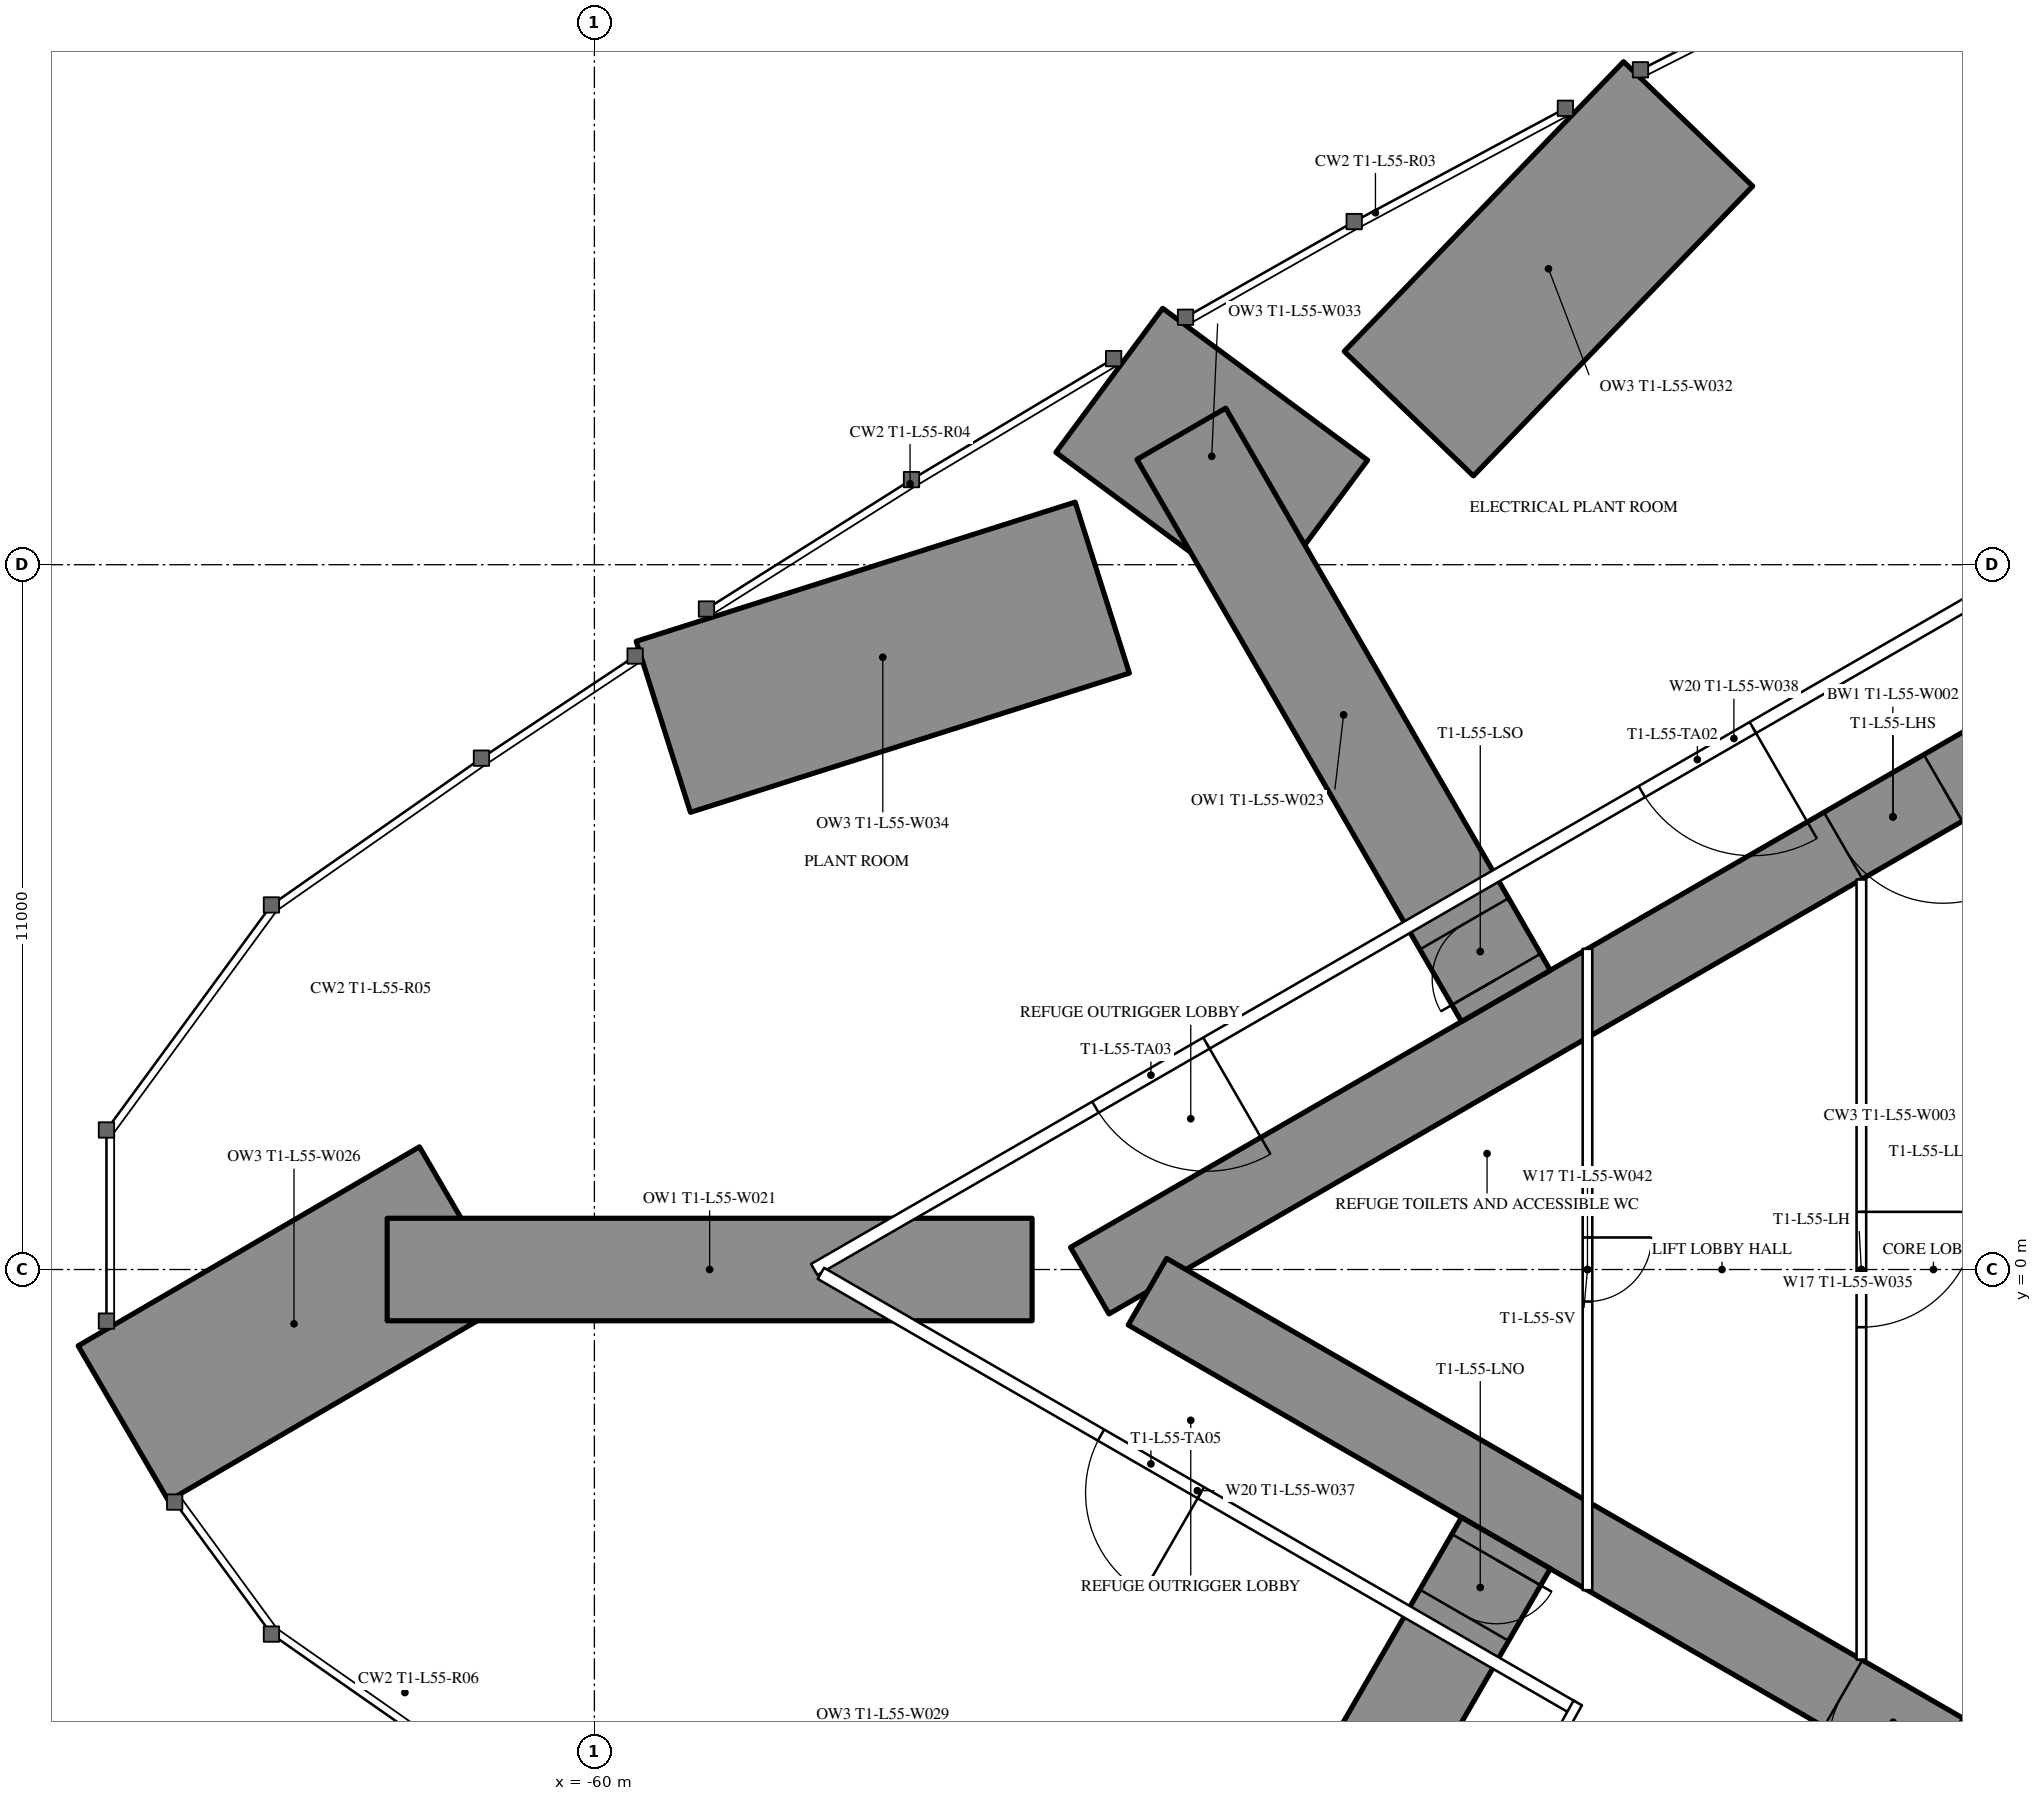
"""IFC4 building model, lengths in metres.
Left out: names, types, materials, properties, quantities, classifications, styles, units other than length and angle.
Written with IfcOpenShell. Run it as: python <this file> out.ifc"""

import sys

from ifc_helpers import new_model, si_unit, direction, frame, frame_2d, origin, place, context, subcontext, project, spatial, rectangle, extrude, element, fill, save


model = new_model("IFC4")
c1 = context("Model", 3, precision=1e-05, world=origin(), true_north=direction((0.0, 1.0)))
c2 = subcontext(c1, "Body", "Model", "MODEL_VIEW")
j1 = project(units=[si_unit("LENGTHUNIT", "METRE"), si_unit("PLANEANGLEUNIT", "RADIAN")], contexts=[c1])
p1 = place(None, origin())
s1 = spatial("IfcSite", under=j1, at=p1, CompositionType="ELEMENT")
p2 = place(p1, origin())
s2 = spatial("IfcBuilding", under=s1, at=p2, CompositionType="ELEMENT")
p3 = place(p2, frame((0.0, 0.0, 205.3)))
s3 = spatial("IfcBuildingStorey", under=s2, at=p3, CompositionType="ELEMENT", Elevation=205.3)
p4 = place(p3, frame((-67.352, -2.4, 0.0), z_axis=(0.0, 0.0, 1.0), x_axis=(0.863922467906, 0.503624830054, 0.0)))
e1 = element("IfcWall", 1, at=p4, inside=s3, PredefinedType="SHEAR", context=c2, shape_type="SweptSolid", body=[
    extrude(rectangle(XDim=6.166, YDim=2.8, at=frame_2d((3.083, 0.0))), origin(), (0.0, 0.0, 1.0), 5.0),
])
p5 = place(p3, frame((-42.929, 17.879, 0.0), z_axis=(0.0, 0.0, 1.0), x_axis=(-0.694103918888, -0.719874815356, 0.0)))
e2 = element("IfcWall", 2, at=p5, inside=s3, PredefinedType="SHEAR", context=c2, shape_type="SweptSolid", body=[
    extrude(rectangle(XDim=6.281, YDim=2.8, at=frame_2d((3.141, 0.0))), origin(), (0.0, 0.0, 1.0), 5.0),
])
p6 = place(p3, frame((-51.964, 13.877, 0.0), z_axis=(0.0, 0.0, 1.0), x_axis=(0.80337247009, -0.595476846151, 0.0)))
e3 = element("IfcWall", 3, at=p6, inside=s3, PredefinedType="SHEAR", context=c2, shape_type="SweptSolid", body=[
    extrude(rectangle(XDim=3.981, YDim=2.8, at=frame_2d((1.99, 0.0))), origin(), (0.0, 0.0, 1.0), 5.0),
])
p7 = place(p3, frame((-58.924, 8.47, 0.0), z_axis=(0.0, 0.0, 1.0), x_axis=(0.953237559777, 0.302222028698, 0.0)))
e4 = element("IfcWall", 4, at=p7, inside=s3, PredefinedType="SHEAR", context=c2, shape_type="SweptSolid", body=[
    extrude(rectangle(XDim=7.187, YDim=2.8, at=frame_2d((3.594, 0.0))), origin(), (0.0, 0.0, 1.0), 5.0),
])
p8 = place(p3, frame((-27.2, 14.3, 0.0), z_axis=(0.0, 0.0, 1.0), x_axis=(-0.866026593062, -0.499997940104, 0.0)))
e5 = element("IfcWall", 5, at=p8, inside=s3, PredefinedType="SHEAR", context=c2, shape_type="SweptSolid", body=[
    extrude(rectangle(XDim=28.946, YDim=1.2, at=frame_2d((14.473, 0.0))), origin(), (0.0, 0.0, 1.0), 5.0),
])
p9 = place(p8, frame((6.5, 0.0, 0.0)))
e6 = element("IfcOpeningElement", 6, at=p9, cuts=e5, PredefinedType="OPENING", context=c2, shape_type="SweptSolid", body=[
    extrude(rectangle(XDim=1.0, YDim=2.2, at=frame_2d((0.5, 1.1))), frame((0.0, 0.61, 0.0), z_axis=(0.0, -1.0, 0.0), x_axis=(1.0, 0.0, 0.0)), (0.0, 0.0, 1.0), 1.22),
])
p10 = place(p8, frame((13.568, 0.0, 0.0)))
e7 = element("IfcOpeningElement", 7, at=p10, cuts=e5, PredefinedType="OPENING", context=c2, shape_type="SweptSolid", body=[
    extrude(rectangle(XDim=1.8, YDim=2.2, at=frame_2d((0.9, 1.1))), frame((0.0, 0.61, 0.0), z_axis=(0.0, -1.0, 0.0), x_axis=(1.0, 0.0, 0.0)), (0.0, 0.0, 1.0), 1.22),
])
p11 = place(p3, frame((-27.2, -14.3, 0.0), z_axis=(0.0, 0.0, 1.0), x_axis=(-0.866024021859, 0.500002393557, 0.0)))
e8 = element("IfcWall", 8, at=p11, inside=s3, PredefinedType="SHEAR", context=c2, shape_type="SweptSolid", body=[
    extrude(rectangle(XDim=27.907, YDim=1.2, at=frame_2d((13.954, 0.0))), origin(), (0.0, 0.0, 1.0), 5.0),
])
p12 = place(p11, frame((6.5, 0.0, 0.0)))
e9 = element("IfcOpeningElement", 9, at=p12, cuts=e8, PredefinedType="OPENING", context=c2, shape_type="SweptSolid", body=[
    extrude(rectangle(XDim=1.0, YDim=2.2, at=frame_2d((0.5, 1.1))), frame((0.0, 0.61, 0.0), z_axis=(0.0, -1.0, 0.0), x_axis=(1.0, 0.0, 0.0)), (0.0, 0.0, 1.0), 1.22),
])
p13 = place(p11, frame((13.568, 0.0, 0.0)))
e10 = element("IfcOpeningElement", 10, at=p13, cuts=e8, PredefinedType="OPENING", context=c2, shape_type="SweptSolid", body=[
    extrude(rectangle(XDim=1.8, YDim=2.2, at=frame_2d((0.9, 1.1))), frame((0.0, 0.61, 0.0), z_axis=(0.0, -1.0, 0.0), x_axis=(1.0, 0.0, 0.0)), (0.0, 0.0, 1.0), 1.22),
])
p14 = place(p3, frame((-45.773, 4.27, 0.0), z_axis=(0.0, 0.0, 1.0), x_axis=(-0.499995723283, 0.866027872934, 0.0)))
e11 = element("IfcWall", 11, at=p14, inside=s3, PredefinedType="SHEAR", context=c2, shape_type="SweptSolid", body=[
    extrude(rectangle(XDim=10.131, YDim=1.6, at=frame_2d((5.065, 0.0))), origin(), (0.0, 0.0, 1.0), 5.0),
])
p15 = place(p14, frame((0.3, 0.0, 0.0)))
e12 = element("IfcOpeningElement", 12, at=p15, cuts=e11, PredefinedType="OPENING", context=c2, shape_type="SweptSolid", body=[
    extrude(rectangle(XDim=1.0, YDim=2.2, at=frame_2d((0.5, 1.1))), frame((0.0, 0.81, 0.0), z_axis=(0.0, -1.0, 0.0), x_axis=(1.0, 0.0, 0.0)), (0.0, 0.0, 1.0), 1.62),
])
p16 = place(p3, frame((-53.168, 0.0, 0.0), z_axis=(0.0, 0.0, 1.0), x_axis=(-1.0, 0.0, 0.0)))
e13 = element("IfcWall", 13, at=p16, inside=s3, PredefinedType="SHEAR", context=c2, shape_type="SweptSolid", body=[
    extrude(rectangle(XDim=10.066, YDim=1.6, at=frame_2d((5.033, 0.0))), origin(), (0.0, 0.0, 1.0), 5.0),
])
p17 = place(p3, frame((-45.773, -4.27, 0.0), z_axis=(0.0, 0.0, 1.0), x_axis=(-0.499995723283, -0.866027872934, 0.0)))
e14 = element("IfcWall", 14, at=p17, inside=s3, PredefinedType="SHEAR", context=c2, shape_type="SweptSolid", body=[
    extrude(rectangle(XDim=10.131, YDim=1.6, at=frame_2d((5.065, 0.0))), origin(), (0.0, 0.0, 1.0), 5.0),
])
p18 = place(p17, frame((0.3, 0.0, 0.0)))
e15 = element("IfcOpeningElement", 15, at=p18, cuts=e14, PredefinedType="OPENING", context=c2, shape_type="SweptSolid", body=[
    extrude(rectangle(XDim=1.0, YDim=2.2, at=frame_2d((0.5, 1.1))), frame((0.0, 0.81, 0.0), z_axis=(0.0, -1.0, 0.0), x_axis=(1.0, 0.0, 0.0)), (0.0, 0.0, 1.0), 1.62),
])
p19 = place(p3, frame((-27.86, 16.575, 0.0), z_axis=(0.0, 0.0, 1.0), x_axis=(-0.866025533911, -0.499999774615, 0.0)))
e16 = element("IfcWall", 16, at=p19, inside=s3, PredefinedType="PARTITIONING", context=c2, shape_type="SweptSolid", body=[
    extrude(rectangle(XDim=33.149, YDim=0.2, at=frame_2d((16.575, 0.0))), origin(), (0.0, 0.0, 1.0), 4.75),
])
p20 = place(p19, frame((6.051, 0.0, 0.0)))
e17 = element("IfcOpeningElement", 17, at=p20, cuts=e16, PredefinedType="OPENING", context=c2, shape_type="SweptSolid", body=[
    extrude(rectangle(XDim=1.8, YDim=2.2, at=frame_2d((0.9, 1.1))), frame((0.0, 0.11, 0.0), z_axis=(0.0, -1.0, 0.0), x_axis=(1.0, 0.0, 0.0)), (0.0, 0.0, 1.0), 0.22),
])
p21 = place(p19, frame((16.234, 0.0, 0.0)))
e18 = element("IfcOpeningElement", 18, at=p21, cuts=e16, PredefinedType="OPENING", context=c2, shape_type="SweptSolid", body=[
    extrude(rectangle(XDim=2.0, YDim=2.4, at=frame_2d((1.0, 1.2))), frame((0.0, 0.11, 0.0), z_axis=(0.0, -1.0, 0.0), x_axis=(1.0, 0.0, 0.0)), (0.0, 0.0, 1.0), 0.22),
])
p22 = place(p19, frame((26.082, 0.0, 0.0)))
e19 = element("IfcOpeningElement", 19, at=p22, cuts=e16, PredefinedType="OPENING", context=c2, shape_type="SweptSolid", body=[
    extrude(rectangle(XDim=2.0, YDim=2.4, at=frame_2d((1.0, 1.2))), frame((0.0, 0.11, 0.0), z_axis=(0.0, -1.0, 0.0), x_axis=(1.0, 0.0, 0.0)), (0.0, 0.0, 1.0), 0.22),
])
p23 = place(p3, frame((-44.715, -6.844, 0.0), z_axis=(0.0, 0.0, 1.0), x_axis=(-0.866025261224, 0.500000246922, 0.0)))
e20 = element("IfcWall", 20, at=p23, inside=s3, PredefinedType="PARTITIONING", context=c2, shape_type="SweptSolid", body=[
    extrude(rectangle(XDim=13.567, YDim=0.2, at=frame_2d((6.783, 0.0))), origin(), (0.0, 0.0, 1.0), 4.75),
])
p24 = place(p23, frame((6.719, 0.0, 0.0)))
e21 = element("IfcOpeningElement", 21, at=p24, cuts=e20, PredefinedType="OPENING", context=c2, shape_type="SweptSolid", body=[
    extrude(rectangle(XDim=1.8, YDim=2.2, at=frame_2d((0.9, 1.1))), frame((0.0, 0.11, 0.0), z_axis=(0.0, -1.0, 0.0), x_axis=(1.0, 0.0, 0.0)), (0.0, 0.0, 1.0), 0.22),
])
p25 = place(p3, frame((-44.652, -6.764, 0.0), z_axis=(0.0, 0.0, 1.0), x_axis=(-0.485528096672, -0.8742210632, 0.0)))
e22 = element("IfcWall", 22, at=p25, inside=s3, PredefinedType="PARTITIONING", context=c2, shape_type="SweptSolid", body=[
    extrude(rectangle(XDim=1.805, YDim=0.15, at=frame_2d((0.903, 0.0))), origin(), (0.0, 0.0, 1.0), 4.75),
])
p26 = place(p25, frame((0.453, 0.0, 0.0)))
e23 = element("IfcOpeningElement", 23, at=p26, cuts=e22, PredefinedType="OPENING", context=c2, shape_type="SweptSolid", body=[
    extrude(rectangle(XDim=0.9, YDim=2.2, at=frame_2d((0.45, 1.1))), frame((0.0, 0.085, 0.0), z_axis=(0.0, -1.0, 0.0), x_axis=(1.0, 0.0, 0.0)), (0.0, 0.0, 1.0), 0.17),
])
p27 = place(p3, frame((-40.225, 6.087, 0.0), z_axis=(0.0, 0.0, 1.0), x_axis=(0.0, -1.0, 0.0)))
e24 = element("IfcWall", 24, at=p27, inside=s3, PredefinedType="PARTITIONING", context=c2, shape_type="SweptSolid", body=[
    extrude(rectangle(XDim=12.174, YDim=0.15, at=frame_2d((6.087, 0.0))), origin(), (0.0, 0.0, 1.0), 4.75),
])
p28 = place(p27, frame((5.187, 0.0, 0.0)))
e25 = element("IfcOpeningElement", 25, at=p28, cuts=e24, PredefinedType="OPENING", context=c2, shape_type="SweptSolid", body=[
    extrude(rectangle(XDim=1.8, YDim=2.2, at=frame_2d((0.9, 1.1))), frame((0.0, 0.085, 0.0), z_axis=(0.0, -1.0, 0.0), x_axis=(1.0, 0.0, 0.0)), (0.0, 0.0, 1.0), 0.17),
])
p29 = place(p3, frame((-44.5, 5.005, 0.0), z_axis=(0.0, 0.0, 1.0), x_axis=(0.0, -1.0, 0.0)))
e26 = element("IfcWall", 26, at=p29, inside=s3, PredefinedType="PARTITIONING", context=c2, shape_type="SweptSolid", body=[
    extrude(rectangle(XDim=10.009, YDim=0.15, at=frame_2d((5.005, 0.0))), origin(), (0.0, 0.0, 1.0), 3.55),
])
p30 = place(p29, frame((4.505, 0.0, 0.0)))
e27 = element("IfcOpeningElement", 27, at=p30, cuts=e26, PredefinedType="OPENING", context=c2, shape_type="SweptSolid", body=[
    extrude(rectangle(XDim=1.0, YDim=2.2, at=frame_2d((0.5, 1.1))), frame((0.0, 0.085, 0.0), z_axis=(0.0, -1.0, 0.0), x_axis=(1.0, 0.0, 0.0)), (0.0, 0.0, 1.0), 0.17),
])
p31 = place(p15, origin())
e28 = element("IfcDoor", 28, at=p31, inside=s3, OperationType="SINGLE_SWING_LEFT", PredefinedType="DOOR", context=c2, shape_type="SweptSolid", body=[
    extrude(rectangle(XDim=1.0, YDim=2.2, at=frame_2d((0.5, 1.1))), frame((0.0, 0.025, 0.0), z_axis=(0.0, -1.0, 0.0), x_axis=(1.0, 0.0, 0.0)), (0.0, 0.0, 1.0), 0.05),
])
fill(e12, e28)
p32 = place(p18, origin())
e29 = element("IfcDoor", 29, at=p32, inside=s3, OperationType="SINGLE_SWING_LEFT", PredefinedType="DOOR", context=c2, shape_type="SweptSolid", body=[
    extrude(rectangle(XDim=1.0, YDim=2.2, at=frame_2d((0.5, 1.1))), frame((0.0, 0.025, 0.0), z_axis=(0.0, -1.0, 0.0), x_axis=(1.0, 0.0, 0.0)), (0.0, 0.0, 1.0), 0.05),
])
fill(e15, e29)
p33 = place(p21, origin())
e30 = element("IfcDoor", 30, at=p33, inside=s3, OperationType="DOUBLE_DOOR_SINGLE_SWING", PredefinedType="DOOR", context=c2, shape_type="SweptSolid", body=[
    extrude(rectangle(XDim=2.0, YDim=2.4, at=frame_2d((1.0, 1.2))), frame((0.0, 0.025, 0.0), z_axis=(0.0, -1.0, 0.0), x_axis=(1.0, 0.0, 0.0)), (0.0, 0.0, 1.0), 0.05),
])
fill(e18, e30)
p34 = place(p22, origin())
e31 = element("IfcDoor", 31, at=p34, inside=s3, OperationType="DOUBLE_DOOR_SINGLE_SWING", PredefinedType="DOOR", context=c2, shape_type="SweptSolid", body=[
    extrude(rectangle(XDim=2.0, YDim=2.4, at=frame_2d((1.0, 1.2))), frame((0.0, 0.025, 0.0), z_axis=(0.0, -1.0, 0.0), x_axis=(1.0, 0.0, 0.0)), (0.0, 0.0, 1.0), 0.05),
])
fill(e19, e31)
p35 = place(p24, origin())
e32 = element("IfcDoor", 32, at=p35, inside=s3, OperationType="DOUBLE_DOOR_SINGLE_SWING", PredefinedType="DOOR", context=c2, shape_type="SweptSolid", body=[
    extrude(rectangle(XDim=1.8, YDim=2.2, at=frame_2d((0.9, 1.1))), frame((0.0, 0.025, 0.0), z_axis=(0.0, -1.0, 0.0), x_axis=(1.0, 0.0, 0.0)), (0.0, 0.0, 1.0), 0.05),
])
fill(e21, e32)
p36 = place(p28, origin())
e33 = element("IfcDoor", 33, at=p36, inside=s3, OperationType="DOUBLE_DOOR_SINGLE_SWING", PredefinedType="DOOR", context=c2, shape_type="SweptSolid", body=[
    extrude(rectangle(XDim=1.8, YDim=2.2, at=frame_2d((0.9, 1.1))), frame((0.0, 0.025, 0.0), z_axis=(0.0, -1.0, 0.0), x_axis=(1.0, 0.0, 0.0)), (0.0, 0.0, 1.0), 0.05),
])
fill(e25, e33)
p37 = place(p30, origin())
e34 = element("IfcDoor", 34, at=p37, inside=s3, OperationType="SINGLE_SWING_LEFT", PredefinedType="DOOR", context=c2, shape_type="SweptSolid", body=[
    extrude(rectangle(XDim=1.0, YDim=2.2, at=frame_2d((0.5, 1.1))), frame((0.0, 0.025, 0.0), z_axis=(0.0, -1.0, 0.0), x_axis=(1.0, 0.0, 0.0)), (0.0, 0.0, 1.0), 0.05),
])
fill(e27, e34)
p38 = place(p10, origin())
e35 = element("IfcDoor", 35, at=p38, inside=s3, OperationType="DOUBLE_DOOR_SINGLE_SWING", PredefinedType="DOOR", context=c2, shape_type="SweptSolid", body=[
    extrude(rectangle(XDim=1.8, YDim=2.2, at=frame_2d((0.9, 1.1))), frame((0.0, 0.025, 0.0), z_axis=(0.0, -1.0, 0.0), x_axis=(1.0, 0.0, 0.0)), (0.0, 0.0, 1.0), 0.05),
])
fill(e7, e35)
p39 = place(p13, origin())
e36 = element("IfcDoor", 36, at=p39, inside=s3, OperationType="DOUBLE_DOOR_SINGLE_SWING", PredefinedType="DOOR", context=c2, shape_type="SweptSolid", body=[
    extrude(rectangle(XDim=1.8, YDim=2.2, at=frame_2d((0.9, 1.1))), frame((0.0, 0.025, 0.0), z_axis=(0.0, -1.0, 0.0), x_axis=(1.0, 0.0, 0.0)), (0.0, 0.0, 1.0), 0.05),
])
fill(e10, e36)
save(model, sys.argv[1])
